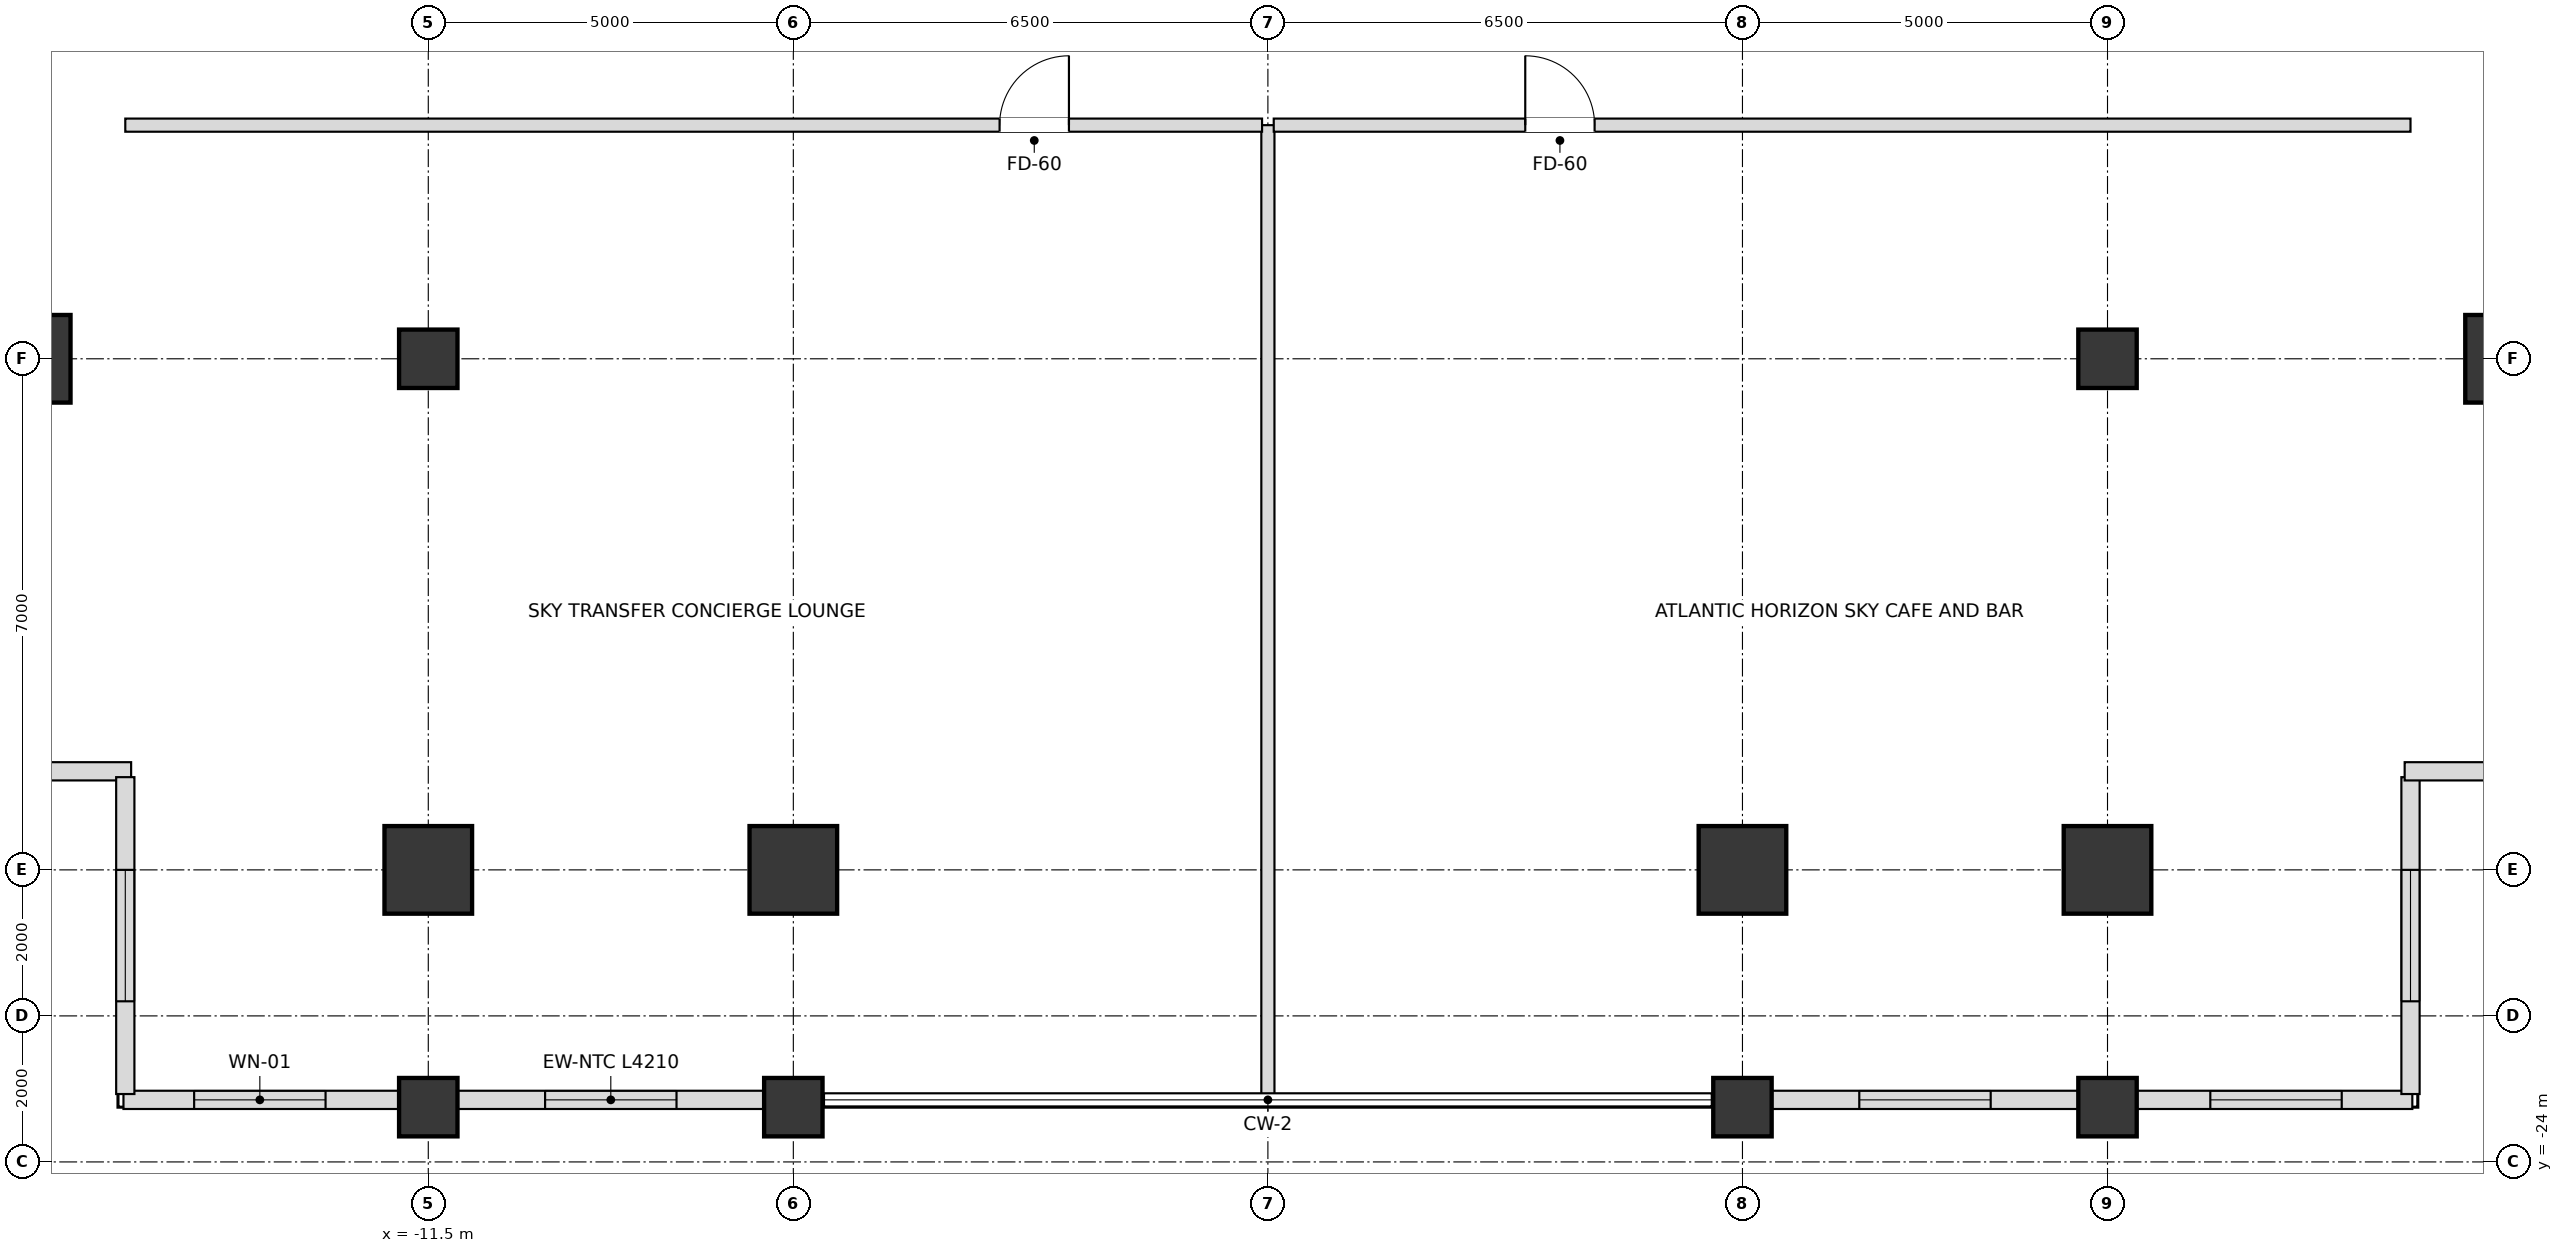
"""IFC4 building model, lengths in metres.
Left out: names, types, materials, properties, quantities, classifications, styles, units other than length and angle.
Written with IfcOpenShell. Run it as: python <this file> out.ifc"""

import sys

from ifc_helpers import new_model, si_unit, direction, frame, frame_2d, origin, origin_2d, place, context, subcontext, project, spatial, rectangle, extrude, element, fill, save


model = new_model("IFC4")
c1 = context("Model", 3, precision=1e-05, world=origin(), true_north=direction((0.0, 1.0)))
c2 = subcontext(c1, "Body", "Model", "MODEL_VIEW")
j1 = project(units=[si_unit("LENGTHUNIT", "METRE"), si_unit("PLANEANGLEUNIT", "RADIAN")], contexts=[c1])
p1 = place(None, origin())
s1 = spatial("IfcSite", under=j1, at=p1, CompositionType="ELEMENT")
p2 = place(p1, origin())
s2 = spatial("IfcBuilding", under=s1, at=p2, CompositionType="ELEMENT")
p3 = place(p2, frame((0.0, 0.0, 129.6)))
s3 = spatial("IfcBuildingStorey", under=s2, at=p3, CompositionType="ELEMENT", Elevation=129.6)
for number, where, z_axis, x_axis in (
    (1, (-11.5, -20.0, 0.0), (0.0, 0.0, 1.0), (1.0, 0.0, 0.0)),
    (2, (-6.5, -20.0, 0.0), (0.0, 0.0, 1.0), (1.0, 0.0, 0.0)),
    (3, (6.5, -20.0, 0.0), (0.0, 0.0, 1.0), (1.0, 0.0, 0.0)),
    (4, (11.5, -20.0, 0.0), (0.0, 0.0, 1.0), (1.0, 0.0, 0.0)),
    (5, (17.0, -13.0, 0.0), (0.0, 0.0, 1.0), (1.0, 0.0, 0.0)),
    (6, (-17.0, -13.0, 0.0), (0.0, 0.0, 1.0), (1.0, 0.0, 0.0)),
):
    element("IfcColumn", number, at=place(p3, frame(where, z_axis=z_axis, x_axis=x_axis)), inside=s3, PredefinedType="USERDEFINED", context=c2, shape_type="SweptSolid", body=[
        extrude(rectangle(XDim=1.2, YDim=1.2, at=origin_2d()), origin(), (0.0, 0.0, 1.0), 3.6),
    ])
for number, where, z_axis, x_axis in (
    (7, (-11.5, -13.0, 0.0), (0.0, 0.0, 1.0), (1.0, 0.0, 0.0)),
    (8, (11.5, -13.0, 0.0), (0.0, 0.0, 1.0), (1.0, 0.0, 0.0)),
    (9, (-11.5, -23.25, 0.0), (0.0, 0.0, 1.0), (1.0, 0.0, 0.0)),
    (10, (-6.5, -23.25, 0.0), (0.0, 0.0, 1.0), (1.0, 0.0, 0.0)),
    (11, (6.5, -23.25, 0.0), (0.0, 0.0, 1.0), (1.0, 0.0, 0.0)),
    (12, (11.5, -23.25, 0.0), (0.0, 0.0, 1.0), (1.0, 0.0, 0.0)),
):
    element("IfcColumn", number, at=place(p3, frame(where, z_axis=z_axis, x_axis=x_axis)), inside=s3, PredefinedType="COLUMN", context=c2, shape_type="SweptSolid", body=[
        extrude(rectangle(XDim=0.8, YDim=0.8, at=origin_2d()), origin(), (0.0, 0.0, 1.0), 3.6),
    ])
p4 = place(p3, frame((-15.675, -23.15, 0.0), z_axis=(0.0, 0.0, 1.0), x_axis=(1.0, 0.0, 0.0)))
e13 = element("IfcWall", 13, at=p4, inside=s3, PredefinedType="SOLIDWALL", context=c2, shape_type="SweptSolid", body=[
    extrude(rectangle(XDim=3.78, YDim=0.25, at=frame_2d((1.89, 0.0))), origin(), (0.0, 0.0, 1.0), 2.736),
])
p5 = place(p4, frame((0.968, 0.0, 0.72)))
e14 = element("IfcOpeningElement", 14, at=p5, cuts=e13, PredefinedType="OPENING", context=c2, shape_type="SweptSolid", body=[
    extrude(rectangle(XDim=1.8, YDim=1.68, at=frame_2d((0.9, 0.84))), frame((0.0, 0.135, 0.0), z_axis=(0.0, -1.0, 0.0), x_axis=(1.0, 0.0, 0.0)), (0.0, 0.0, 1.0), 0.27),
])
p6 = place(p3, frame((-11.105, -23.15, 0.0), z_axis=(0.0, 0.0, 1.0), x_axis=(1.0, 0.0, 0.0)))
e15 = element("IfcWall", 15, at=p6, inside=s3, PredefinedType="SOLIDWALL", context=c2, shape_type="SweptSolid", body=[
    extrude(rectangle(XDim=4.21, YDim=0.25, at=frame_2d((2.105, 0.0))), origin(), (0.0, 0.0, 1.0), 2.736),
])
p7 = place(p6, frame((1.205, 0.0, 0.72)))
e16 = element("IfcOpeningElement", 16, at=p7, cuts=e15, PredefinedType="OPENING", context=c2, shape_type="SweptSolid", body=[
    extrude(rectangle(XDim=1.8, YDim=1.68, at=frame_2d((0.9, 0.84))), frame((0.0, 0.135, 0.0), z_axis=(0.0, -1.0, 0.0), x_axis=(1.0, 0.0, 0.0)), (0.0, 0.0, 1.0), 0.27),
])
p8 = place(p3, frame((6.895, -23.15, 0.0), z_axis=(0.0, 0.0, 1.0), x_axis=(1.0, 0.0, 0.0)))
e17 = element("IfcWall", 17, at=p8, inside=s3, PredefinedType="SOLIDWALL", context=c2, shape_type="SweptSolid", body=[
    extrude(rectangle(XDim=4.21, YDim=0.25, at=frame_2d((2.105, 0.0))), origin(), (0.0, 0.0, 1.0), 2.736),
])
p9 = place(p8, frame((1.205, 0.0, 0.72)))
e18 = element("IfcOpeningElement", 18, at=p9, cuts=e17, PredefinedType="OPENING", context=c2, shape_type="SweptSolid", body=[
    extrude(rectangle(XDim=1.8, YDim=1.68, at=frame_2d((0.9, 0.84))), frame((0.0, 0.135, 0.0), z_axis=(0.0, -1.0, 0.0), x_axis=(1.0, 0.0, 0.0)), (0.0, 0.0, 1.0), 0.27),
])
p10 = place(p3, frame((11.895, -23.15, 0.0), z_axis=(0.0, 0.0, 1.0), x_axis=(1.0, 0.0, 0.0)))
e19 = element("IfcWall", 19, at=p10, inside=s3, PredefinedType="SOLIDWALL", context=c2, shape_type="SweptSolid", body=[
    extrude(rectangle(XDim=3.78, YDim=0.25, at=frame_2d((1.89, 0.0))), origin(), (0.0, 0.0, 1.0), 2.736),
])
p11 = place(p10, frame((1.013, 0.0, 0.72)))
e20 = element("IfcOpeningElement", 20, at=p11, cuts=e19, PredefinedType="OPENING", context=c2, shape_type="SweptSolid", body=[
    extrude(rectangle(XDim=1.8, YDim=1.68, at=frame_2d((0.9, 0.84))), frame((0.0, 0.135, 0.0), z_axis=(0.0, -1.0, 0.0), x_axis=(1.0, 0.0, 0.0)), (0.0, 0.0, 1.0), 0.27),
])
p12 = place(p3, frame((-20.23, -18.65, 0.0), z_axis=(0.0, 0.0, 1.0), x_axis=(1.0, 0.0, 0.0)))
e21 = element("IfcWall", 21, at=p12, inside=s3, PredefinedType="SOLIDWALL", context=c2, shape_type="SweptSolid", body=[
    extrude(rectangle(XDim=4.66, YDim=0.25, at=frame_2d((2.33, 0.0))), origin(), (0.0, 0.0, 1.0), 2.736),
])
p13 = place(p12, frame((1.43, 0.0, 0.72)))
e22 = element("IfcOpeningElement", 22, at=p13, cuts=e21, PredefinedType="OPENING", context=c2, shape_type="SweptSolid", body=[
    extrude(rectangle(XDim=1.8, YDim=1.68, at=frame_2d((0.9, 0.84))), frame((0.0, 0.135, 0.0), z_axis=(0.0, -1.0, 0.0), x_axis=(1.0, 0.0, 0.0)), (0.0, 0.0, 1.0), 0.27),
])
p14 = place(p3, frame((-15.65, -18.73, 0.0), z_axis=(0.0, 0.0, 1.0), x_axis=(0.0, -1.0, 0.0)))
e23 = element("IfcWall", 23, at=p14, inside=s3, PredefinedType="SOLIDWALL", context=c2, shape_type="SweptSolid", body=[
    extrude(rectangle(XDim=4.34, YDim=0.25, at=frame_2d((2.17, 0.0))), origin(), (0.0, 0.0, 1.0), 2.736),
])
p15 = place(p14, frame((1.27, 0.0, 0.72)))
e24 = element("IfcOpeningElement", 24, at=p15, cuts=e23, PredefinedType="OPENING", context=c2, shape_type="SweptSolid", body=[
    extrude(rectangle(XDim=1.8, YDim=1.68, at=frame_2d((0.9, 0.84))), frame((0.0, 0.135, 0.0), z_axis=(0.0, -1.0, 0.0), x_axis=(1.0, 0.0, 0.0)), (0.0, 0.0, 1.0), 0.27),
])
p16 = place(p3, frame((15.65, -23.07, 0.0), z_axis=(0.0, 0.0, 1.0), x_axis=(0.0, 1.0, 0.0)))
e25 = element("IfcWall", 25, at=p16, inside=s3, PredefinedType="SOLIDWALL", context=c2, shape_type="SweptSolid", body=[
    extrude(rectangle(XDim=4.34, YDim=0.25, at=frame_2d((2.17, 0.0))), origin(), (0.0, 0.0, 1.0), 2.736),
])
p17 = place(p16, frame((1.27, 0.0, 0.72)))
e26 = element("IfcOpeningElement", 26, at=p17, cuts=e25, PredefinedType="OPENING", context=c2, shape_type="SweptSolid", body=[
    extrude(rectangle(XDim=1.8, YDim=1.68, at=frame_2d((0.9, 0.84))), frame((0.0, 0.135, 0.0), z_axis=(0.0, -1.0, 0.0), x_axis=(1.0, 0.0, 0.0)), (0.0, 0.0, 1.0), 0.27),
])
p18 = place(p3, frame((15.57, -18.65, 0.0), z_axis=(0.0, 0.0, 1.0), x_axis=(1.0, 0.0, 0.0)))
e27 = element("IfcWall", 27, at=p18, inside=s3, PredefinedType="SOLIDWALL", context=c2, shape_type="SweptSolid", body=[
    extrude(rectangle(XDim=4.66, YDim=0.25, at=frame_2d((2.33, 0.0))), origin(), (0.0, 0.0, 1.0), 2.736),
])
p19 = place(p18, frame((1.43, 0.0, 0.72)))
e28 = element("IfcOpeningElement", 28, at=p19, cuts=e27, PredefinedType="OPENING", context=c2, shape_type="SweptSolid", body=[
    extrude(rectangle(XDim=1.8, YDim=1.68, at=frame_2d((0.9, 0.84))), frame((0.0, 0.135, 0.0), z_axis=(0.0, -1.0, 0.0), x_axis=(1.0, 0.0, 0.0)), (0.0, 0.0, 1.0), 0.27),
])
p20 = place(p3, frame((0.0, -23.15, 0.0), z_axis=(0.0, 0.0, 1.0), x_axis=(0.0, 1.0, 0.0)))
e29 = element("IfcWall", 29, at=p20, inside=s3, PredefinedType="PARTITIONING", context=c2, shape_type="SweptSolid", body=[
    extrude(rectangle(XDim=13.35, YDim=0.18, at=frame_2d((6.675, 0.0))), origin(), (0.0, 0.0, 1.0), 2.816),
])
p21 = place(p3, frame((-15.65, -9.8, 0.0), z_axis=(0.0, 0.0, 1.0), x_axis=(1.0, 0.0, 0.0)))
e30 = element("IfcWall", 30, at=p21, inside=s3, PredefinedType="PARTITIONING", context=c2, shape_type="SweptSolid", body=[
    extrude(rectangle(XDim=15.57, YDim=0.18, at=frame_2d((7.785, 0.0))), origin(), (0.0, 0.0, 1.0), 2.816),
])
p22 = place(p21, frame((11.975, 0.0, 0.0)))
e31 = element("IfcOpeningElement", 31, at=p22, cuts=e30, PredefinedType="OPENING", context=c2, shape_type="SweptSolid", body=[
    extrude(rectangle(XDim=0.95, YDim=2.15, at=frame_2d((0.475, 1.075))), frame((0.0, 0.1, 0.0), z_axis=(0.0, -1.0, 0.0), x_axis=(1.0, 0.0, 0.0)), (0.0, 0.0, 1.0), 0.2),
])
p23 = place(p3, frame((0.08, -9.8, 0.0), z_axis=(0.0, 0.0, 1.0), x_axis=(1.0, 0.0, 0.0)))
e32 = element("IfcWall", 32, at=p23, inside=s3, PredefinedType="PARTITIONING", context=c2, shape_type="SweptSolid", body=[
    extrude(rectangle(XDim=15.57, YDim=0.18, at=frame_2d((7.785, 0.0))), origin(), (0.0, 0.0, 1.0), 2.816),
])
p24 = place(p23, frame((3.445, 0.0, 0.0)))
e33 = element("IfcOpeningElement", 33, at=p24, cuts=e32, PredefinedType="OPENING", context=c2, shape_type="SweptSolid", body=[
    extrude(rectangle(XDim=0.95, YDim=2.15, at=frame_2d((0.475, 1.075))), frame((0.0, 0.1, 0.0), z_axis=(0.0, -1.0, 0.0), x_axis=(1.0, 0.0, 0.0)), (0.0, 0.0, 1.0), 0.2),
])
p25 = place(p5, origin())
e34 = element("IfcWindow", 34, at=p25, inside=s3, PartitioningType="SINGLE_PANEL", PredefinedType="WINDOW", context=c2, shape_type="SweptSolid", body=[
    extrude(rectangle(XDim=1.8, YDim=1.68, at=frame_2d((0.9, 0.84))), frame((0.0, 0.03, 0.0), z_axis=(0.0, -1.0, 0.0), x_axis=(1.0, 0.0, 0.0)), (0.0, 0.0, 1.0), 0.06),
])
fill(e14, e34)
p26 = place(p7, origin())
e35 = element("IfcWindow", 35, at=p26, inside=s3, PartitioningType="SINGLE_PANEL", PredefinedType="WINDOW", context=c2, shape_type="SweptSolid", body=[
    extrude(rectangle(XDim=1.8, YDim=1.68, at=frame_2d((0.9, 0.84))), frame((0.0, 0.03, 0.0), z_axis=(0.0, -1.0, 0.0), x_axis=(1.0, 0.0, 0.0)), (0.0, 0.0, 1.0), 0.06),
])
fill(e16, e35)
p27 = place(p9, origin())
e36 = element("IfcWindow", 36, at=p27, inside=s3, PartitioningType="SINGLE_PANEL", PredefinedType="WINDOW", context=c2, shape_type="SweptSolid", body=[
    extrude(rectangle(XDim=1.8, YDim=1.68, at=frame_2d((0.9, 0.84))), frame((0.0, 0.03, 0.0), z_axis=(0.0, -1.0, 0.0), x_axis=(1.0, 0.0, 0.0)), (0.0, 0.0, 1.0), 0.06),
])
fill(e18, e36)
p28 = place(p11, origin())
e37 = element("IfcWindow", 37, at=p28, inside=s3, PartitioningType="SINGLE_PANEL", PredefinedType="WINDOW", context=c2, shape_type="SweptSolid", body=[
    extrude(rectangle(XDim=1.8, YDim=1.68, at=frame_2d((0.9, 0.84))), frame((0.0, 0.03, 0.0), z_axis=(0.0, -1.0, 0.0), x_axis=(1.0, 0.0, 0.0)), (0.0, 0.0, 1.0), 0.06),
])
fill(e20, e37)
p29 = place(p15, origin())
e38 = element("IfcWindow", 38, at=p29, inside=s3, PartitioningType="SINGLE_PANEL", PredefinedType="WINDOW", context=c2, shape_type="SweptSolid", body=[
    extrude(rectangle(XDim=1.8, YDim=1.68, at=frame_2d((0.9, 0.84))), frame((0.0, 0.03, 0.0), z_axis=(0.0, -1.0, 0.0), x_axis=(1.0, 0.0, 0.0)), (0.0, 0.0, 1.0), 0.06),
])
fill(e24, e38)
p30 = place(p17, origin())
e39 = element("IfcWindow", 39, at=p30, inside=s3, PartitioningType="SINGLE_PANEL", PredefinedType="WINDOW", context=c2, shape_type="SweptSolid", body=[
    extrude(rectangle(XDim=1.8, YDim=1.68, at=frame_2d((0.9, 0.84))), frame((0.0, 0.03, 0.0), z_axis=(0.0, -1.0, 0.0), x_axis=(1.0, 0.0, 0.0)), (0.0, 0.0, 1.0), 0.06),
])
fill(e26, e39)
p31 = place(p22, origin())
e40 = element("IfcDoor", 40, at=p31, inside=s3, OperationType="SINGLE_SWING_RIGHT", PredefinedType="DOOR", context=c2, shape_type="SweptSolid", body=[
    extrude(rectangle(XDim=0.95, YDim=2.15, at=frame_2d((0.475, 1.075))), frame((0.0, 0.025, 0.0), z_axis=(0.0, -1.0, 0.0), x_axis=(1.0, 0.0, 0.0)), (0.0, 0.0, 1.0), 0.05),
])
fill(e31, e40)
p32 = place(p24, origin())
e41 = element("IfcDoor", 41, at=p32, inside=s3, OperationType="SINGLE_SWING_LEFT", PredefinedType="DOOR", context=c2, shape_type="SweptSolid", body=[
    extrude(rectangle(XDim=0.95, YDim=2.15, at=frame_2d((0.475, 1.075))), frame((0.0, 0.025, 0.0), z_axis=(0.0, -1.0, 0.0), x_axis=(1.0, 0.0, 0.0)), (0.0, 0.0, 1.0), 0.05),
])
fill(e33, e41)
save(model, sys.argv[1])
